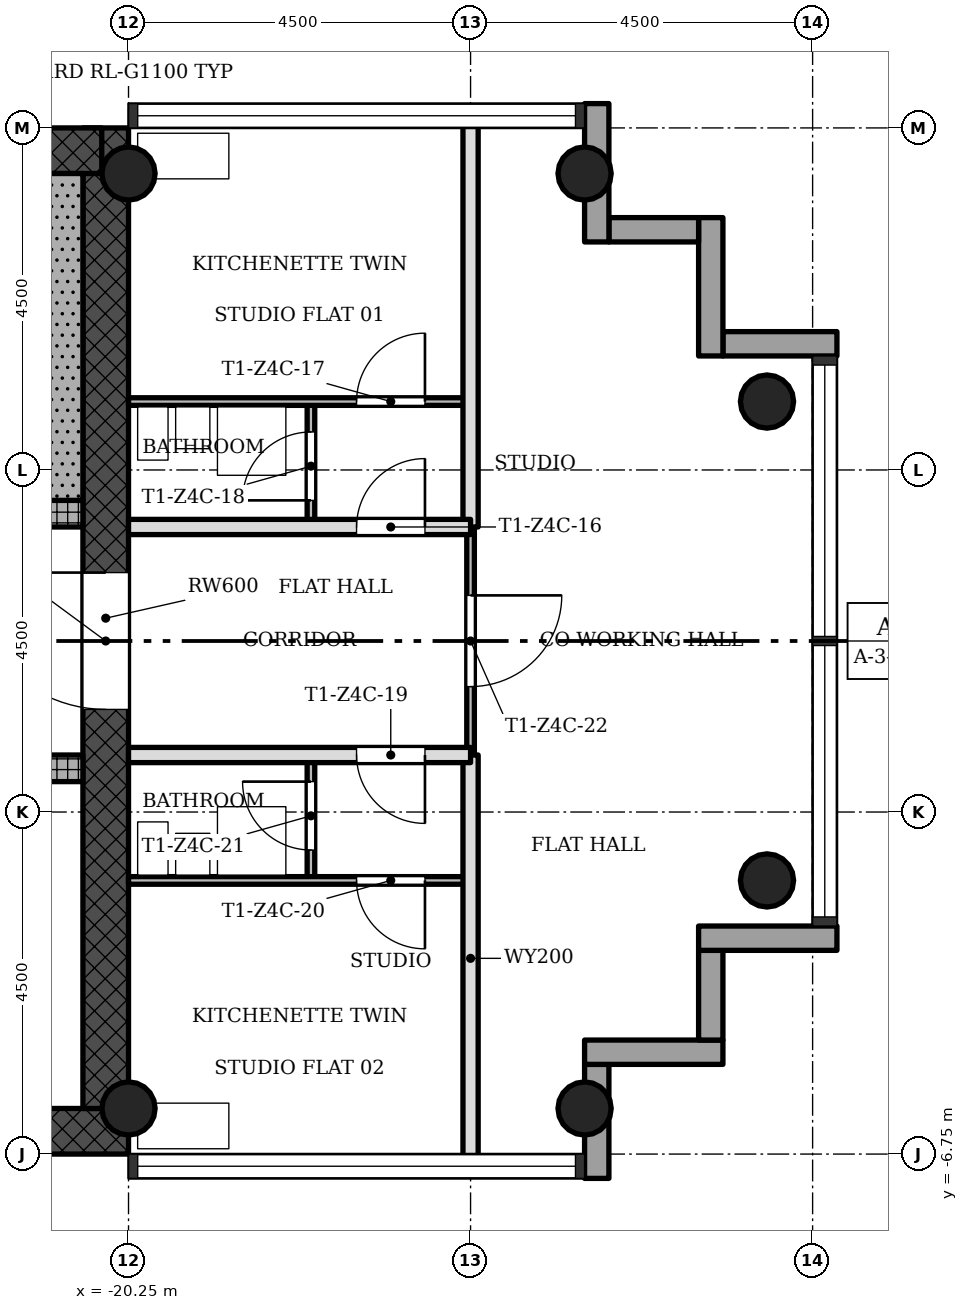
"""IFC4 building model, lengths in metres.
Left out: names, types, materials, properties, quantities, classifications, styles, units other than length and angle.
Written with IfcOpenShell. Run it as: python <this file> out.ifc"""

import sys

from ifc_helpers import new_model, si_unit, direction, frame, frame_2d, origin, origin_2d, place, context, subcontext, project, spatial, rectangle, hollow_circle, extrude, element, fill, save


model = new_model("IFC4")
c1 = context("Model", 3, precision=1e-05, world=origin(), true_north=direction((0.0, 1.0)))
c2 = subcontext(c1, "Body", "Model", "MODEL_VIEW")
j1 = project(units=[si_unit("LENGTHUNIT", "METRE"), si_unit("PLANEANGLEUNIT", "RADIAN")], contexts=[c1])
p1 = place(None, origin())
s1 = spatial("IfcSite", under=j1, at=p1, CompositionType="ELEMENT")
p2 = place(p1, origin())
s2 = spatial("IfcBuilding", under=s1, at=p2, CompositionType="ELEMENT")
p3 = place(p2, frame((0.0, 0.0, 192.6)))
s3 = spatial("IfcBuildingStorey", under=s2, at=p3, CompositionType="ELEMENT", Elevation=192.6)
p4 = place(p3, frame((-28.65, -6.45, 0.0), z_axis=(0.0, 0.0, 1.0), x_axis=(1.0, 0.0, 0.0)))
e1 = element("IfcWall", 1, at=p4, inside=s3, PredefinedType="SHEAR", context=c2, shape_type="SweptSolid", body=[
    extrude(rectangle(XDim=8.4, YDim=0.6, at=frame_2d((4.2, 0.0))), origin(), (0.0, 0.0, 1.0), 3.4),
])
p5 = place(p3, frame((-20.55, -6.15, 0.0), z_axis=(0.0, 0.0, 1.0), x_axis=(0.0, 1.0, 0.0)))
e2 = element("IfcWall", 2, at=p5, inside=s3, PredefinedType="SHEAR", context=c2, shape_type="SweptSolid", body=[
    extrude(rectangle(XDim=12.9, YDim=0.6, at=frame_2d((6.45, 0.0))), origin(), (0.0, 0.0, 1.0), 3.4),
])
p6 = place(p5, frame((5.25, 0.0, 0.0)))
e3 = element("IfcOpeningElement", 3, at=p6, cuts=e2, PredefinedType="OPENING", context=c2, shape_type="SweptSolid", body=[
    extrude(rectangle(XDim=1.8, YDim=2.1, at=frame_2d((0.9, 1.05))), frame((0.0, 0.31, 0.0), z_axis=(0.0, -1.0, 0.0), x_axis=(1.0, 0.0, 0.0)), (0.0, 0.0, 1.0), 0.62),
])
p7 = place(p3, frame((-20.602, 6.45, 0.0), z_axis=(0.0, 0.0, 1.0), x_axis=(-1.0, 0.0, 0.0)))
e4 = element("IfcWall", 4, at=p7, inside=s3, PredefinedType="SHEAR", context=c2, shape_type="SweptSolid", body=[
    extrude(rectangle(XDim=8.896, YDim=0.6, at=frame_2d((4.448, 0.0))), origin(), (0.0, 0.0, 1.0), 3.4),
])
p8 = place(p3, frame((-28.65, -1.675, 0.0), z_axis=(0.0, 0.0, 1.0), x_axis=(1.0, 0.0, 0.0)))
e5 = element("IfcWall", 5, at=p8, inside=s3, PredefinedType="SHEAR", context=c2, shape_type="SweptSolid", body=[
    extrude(rectangle(XDim=7.8, YDim=0.35, at=frame_2d((3.9, 0.0))), origin(), (0.0, 0.0, 1.0), 3.4),
])
p9 = place(p8, frame((1.15, 0.0, 0.0)))
e6 = element("IfcOpeningElement", 6, at=p9, cuts=e5, PredefinedType="OPENING", context=c2, shape_type="SweptSolid", body=[
    extrude(rectangle(XDim=1.1, YDim=2.1, at=frame_2d((0.55, 1.05))), frame((0.0, 0.185, 0.0), z_axis=(0.0, -1.0, 0.0), x_axis=(1.0, 0.0, 0.0)), (0.0, 0.0, 1.0), 0.37),
])
p10 = place(p8, frame((3.35, 0.0, 0.0)))
e7 = element("IfcOpeningElement", 7, at=p10, cuts=e5, PredefinedType="OPENING", context=c2, shape_type="SweptSolid", body=[
    extrude(rectangle(XDim=1.1, YDim=2.1, at=frame_2d((0.55, 1.05))), frame((0.0, 0.185, 0.0), z_axis=(0.0, -1.0, 0.0), x_axis=(1.0, 0.0, 0.0)), (0.0, 0.0, 1.0), 0.37),
])
p11 = place(p8, frame((5.55, 0.0, 0.0)))
e8 = element("IfcOpeningElement", 8, at=p11, cuts=e5, PredefinedType="OPENING", context=c2, shape_type="SweptSolid", body=[
    extrude(rectangle(XDim=1.1, YDim=2.1, at=frame_2d((0.55, 1.05))), frame((0.0, 0.185, 0.0), z_axis=(0.0, -1.0, 0.0), x_axis=(1.0, 0.0, 0.0)), (0.0, 0.0, 1.0), 0.37),
])
p12 = place(p3, frame((-28.65, 1.675, 0.0), z_axis=(0.0, 0.0, 1.0), x_axis=(1.0, 0.0, 0.0)))
e9 = element("IfcWall", 9, at=p12, inside=s3, PredefinedType="SHEAR", context=c2, shape_type="SweptSolid", body=[
    extrude(rectangle(XDim=7.8, YDim=0.35, at=frame_2d((3.9, 0.0))), origin(), (0.0, 0.0, 1.0), 3.4),
])
p13 = place(p12, frame((1.05, 0.0, 0.0)))
e10 = element("IfcOpeningElement", 10, at=p13, cuts=e9, PredefinedType="OPENING", context=c2, shape_type="SweptSolid", body=[
    extrude(rectangle(XDim=0.9, YDim=2.1, at=frame_2d((0.45, 1.05))), frame((0.0, 0.185, 0.0), z_axis=(0.0, -1.0, 0.0), x_axis=(1.0, 0.0, 0.0)), (0.0, 0.0, 1.0), 0.37),
])
for number, where, z_axis, x_axis in (
    (11, (-20.25, -6.15, 0.0), (0.0, 0.0, 1.0), (1.0, 0.0, 0.0)),
    (12, (-20.25, 6.15, 0.0), (0.0, 0.0, 1.0), (1.0, 0.0, 0.0)),
    (13, (-14.25, -6.15, 0.0), (0.0, 0.0, 1.0), (1.0, 0.0, 0.0)),
    (14, (-14.25, 6.15, 0.0), (0.0, 0.0, 1.0), (1.0, 0.0, 0.0)),
    (15, (-11.85, -3.15, 0.0), (0.0, 0.0, 1.0), (1.0, 0.0, 0.0)),
    (16, (-11.85, 3.15, 0.0), (0.0, 0.0, 1.0), (1.0, 0.0, 0.0)),
):
    element("IfcColumn", number, at=place(p3, frame(where, z_axis=z_axis, x_axis=x_axis)), inside=s3, PredefinedType="COLUMN", context=c2, shape_type="SweptSolid", body=[
        extrude(hollow_circle(Radius=0.35, WallThickness=0.025, at=origin_2d()), origin(), (0.0, 0.0, 1.0), 3.4),
    ])
p14 = place(p3, frame((-14.09, -7.07, -0.3), z_axis=(0.0, 0.0, 1.0), x_axis=(0.0, 1.0, 0.0)))
e17 = element("IfcWall", 17, at=p14, inside=s3, PredefinedType="STANDARD", context=c2, shape_type="SweptSolid", body=[
    extrude(rectangle(XDim=1.5, YDim=0.32, at=frame_2d((0.75, 0.0))), origin(), (0.0, 0.0, 1.0), 3.4),
])
p15 = place(p3, frame((-14.25, -5.41, -0.3), z_axis=(0.0, 0.0, 1.0), x_axis=(1.0, 0.0, 0.0)))
e18 = element("IfcWall", 18, at=p15, inside=s3, PredefinedType="STANDARD", context=c2, shape_type="SweptSolid", body=[
    extrude(rectangle(XDim=1.82, YDim=0.32, at=frame_2d((0.91, 0.0))), origin(), (0.0, 0.0, 1.0), 3.4),
])
p16 = place(p3, frame((-12.59, -5.25, -0.3), z_axis=(0.0, 0.0, 1.0), x_axis=(0.0, 1.0, 0.0)))
e19 = element("IfcWall", 19, at=p16, inside=s3, PredefinedType="STANDARD", context=c2, shape_type="SweptSolid", body=[
    extrude(rectangle(XDim=1.18, YDim=0.32, at=frame_2d((0.59, 0.0))), origin(), (0.0, 0.0, 1.0), 3.4),
])
p17 = place(p3, frame((-12.75, -3.91, -0.3), z_axis=(0.0, 0.0, 1.0), x_axis=(1.0, 0.0, 0.0)))
e20 = element("IfcWall", 20, at=p17, inside=s3, PredefinedType="STANDARD", context=c2, shape_type="SweptSolid", body=[
    extrude(rectangle(XDim=1.82, YDim=0.32, at=frame_2d((0.91, 0.0))), origin(), (0.0, 0.0, 1.0), 3.4),
])
p18 = place(p3, frame((-10.93, 3.91, -0.3), z_axis=(0.0, 0.0, 1.0), x_axis=(-1.0, 0.0, 0.0)))
e21 = element("IfcWall", 21, at=p18, inside=s3, PredefinedType="STANDARD", context=c2, shape_type="SweptSolid", body=[
    extrude(rectangle(XDim=1.5, YDim=0.32, at=frame_2d((0.75, 0.0))), origin(), (0.0, 0.0, 1.0), 3.4),
])
p19 = place(p3, frame((-12.59, 3.75, -0.3), z_axis=(0.0, 0.0, 1.0), x_axis=(0.0, 1.0, 0.0)))
e22 = element("IfcWall", 22, at=p19, inside=s3, PredefinedType="STANDARD", context=c2, shape_type="SweptSolid", body=[
    extrude(rectangle(XDim=1.82, YDim=0.32, at=frame_2d((0.91, 0.0))), origin(), (0.0, 0.0, 1.0), 3.4),
])
p20 = place(p3, frame((-12.75, 5.41, -0.3), z_axis=(0.0, 0.0, 1.0), x_axis=(-1.0, 0.0, 0.0)))
e23 = element("IfcWall", 23, at=p20, inside=s3, PredefinedType="STANDARD", context=c2, shape_type="SweptSolid", body=[
    extrude(rectangle(XDim=1.18, YDim=0.32, at=frame_2d((0.59, 0.0))), origin(), (0.0, 0.0, 1.0), 3.4),
])
p21 = place(p3, frame((-14.09, 5.25, -0.3), z_axis=(0.0, 0.0, 1.0), x_axis=(0.0, 1.0, 0.0)))
e24 = element("IfcWall", 24, at=p21, inside=s3, PredefinedType="STANDARD", context=c2, shape_type="SweptSolid", body=[
    extrude(rectangle(XDim=1.82, YDim=0.32, at=frame_2d((0.91, 0.0))), origin(), (0.0, 0.0, 1.0), 3.4),
])
p22 = place(p3, frame((-17.85, -3.15, 0.0), z_axis=(0.0, 0.0, 1.0), x_axis=(0.0, 1.0, 0.0)))
e25 = element("IfcWall", 25, at=p22, inside=s3, PredefinedType="PARTITIONING", context=c2, shape_type="SweptSolid", body=[
    extrude(rectangle(XDim=1.65, YDim=0.1, at=frame_2d((0.825, 0.0))), origin(), (0.0, 0.0, 1.0), 3.0),
])
p23 = place(p22, frame((0.4, 0.0, 0.0)))
e26 = element("IfcOpeningElement", 26, at=p23, cuts=e25, PredefinedType="OPENING", context=c2, shape_type="SweptSolid", body=[
    extrude(rectangle(XDim=0.9, YDim=2.1, at=frame_2d((0.45, 1.05))), frame((0.0, 0.06, 0.0), z_axis=(0.0, -1.0, 0.0), x_axis=(1.0, 0.0, 0.0)), (0.0, 0.0, 1.0), 0.12),
])
p24 = place(p3, frame((-17.85, 1.5, 0.0), z_axis=(0.0, 0.0, 1.0), x_axis=(0.0, 1.0, 0.0)))
e27 = element("IfcWall", 27, at=p24, inside=s3, PredefinedType="PARTITIONING", context=c2, shape_type="SweptSolid", body=[
    extrude(rectangle(XDim=1.65, YDim=0.1, at=frame_2d((0.825, 0.0))), origin(), (0.0, 0.0, 1.0), 3.0),
])
p25 = place(p24, frame((0.35, 0.0, 0.0)))
e28 = element("IfcOpeningElement", 28, at=p25, cuts=e27, PredefinedType="OPENING", context=c2, shape_type="SweptSolid", body=[
    extrude(rectangle(XDim=0.9, YDim=2.1, at=frame_2d((0.45, 1.05))), frame((0.0, 0.06, 0.0), z_axis=(0.0, -1.0, 0.0), x_axis=(1.0, 0.0, 0.0)), (0.0, 0.0, 1.0), 0.12),
])
p26 = place(p3, frame((-15.75, -1.5, 0.0), z_axis=(0.0, 0.0, 1.0), x_axis=(0.0, 1.0, 0.0)))
e29 = element("IfcWall", 29, at=p26, inside=s3, PredefinedType="PARTITIONING", context=c2, shape_type="SweptSolid", body=[
    extrude(rectangle(XDim=3.0, YDim=0.1, at=frame_2d((1.5, 0.0))), origin(), (0.0, 0.0, 1.0), 3.0),
])
p27 = place(p26, frame((0.9, 0.0, 0.0)))
e30 = element("IfcOpeningElement", 30, at=p27, cuts=e29, PredefinedType="OPENING", context=c2, shape_type="SweptSolid", body=[
    extrude(rectangle(XDim=1.2, YDim=2.1, at=frame_2d((0.6, 1.05))), frame((0.0, 0.06, 0.0), z_axis=(0.0, -1.0, 0.0), x_axis=(1.0, 0.0, 0.0)), (0.0, 0.0, 1.0), 0.12),
])
for number, where, z_axis, x_axis in (
    (31, (-15.75, -6.85, 0.0), (0.0, 0.0, 1.0), (0.0, 1.0, 0.0)),
    (32, (-15.75, 1.5, 0.0), (0.0, 0.0, 1.0), (0.0, 1.0, 0.0)),
):
    element("IfcWall", number, at=place(p3, frame(where, z_axis=z_axis, x_axis=x_axis)), inside=s3, PredefinedType="SOLIDWALL", context=c2, shape_type="SweptSolid", body=[
        extrude(rectangle(XDim=5.35, YDim=0.2, at=frame_2d((2.675, 0.0))), origin(), (0.0, 0.0, 1.0), 3.0),
    ])
p28 = place(p3, frame((-20.25, -3.15, 0.0), z_axis=(0.0, 0.0, 1.0), x_axis=(1.0, 0.0, 0.0)))
e33 = element("IfcWall", 33, at=p28, inside=s3, PredefinedType="PARTITIONING", context=c2, shape_type="SweptSolid", body=[
    extrude(rectangle(XDim=4.5, YDim=0.1, at=frame_2d((2.25, 0.0))), origin(), (0.0, 0.0, 1.0), 3.0),
])
p29 = place(p28, frame((3.0, 0.0, 0.0)))
e34 = element("IfcOpeningElement", 34, at=p29, cuts=e33, PredefinedType="OPENING", context=c2, shape_type="SweptSolid", body=[
    extrude(rectangle(XDim=0.9, YDim=2.1, at=frame_2d((0.45, 1.05))), frame((0.0, 0.06, 0.0), z_axis=(0.0, -1.0, 0.0), x_axis=(1.0, 0.0, 0.0)), (0.0, 0.0, 1.0), 0.12),
])
p30 = place(p3, frame((-20.25, -1.5, 0.0), z_axis=(0.0, 0.0, 1.0), x_axis=(1.0, 0.0, 0.0)))
e35 = element("IfcWall", 35, at=p30, inside=s3, PredefinedType="SOLIDWALL", context=c2, shape_type="SweptSolid", body=[
    extrude(rectangle(XDim=4.5, YDim=0.2, at=frame_2d((2.25, 0.0))), origin(), (0.0, 0.0, 1.0), 3.0),
])
p31 = place(p30, frame((3.0, 0.0, 0.0)))
e36 = element("IfcOpeningElement", 36, at=p31, cuts=e35, PredefinedType="OPENING", context=c2, shape_type="SweptSolid", body=[
    extrude(rectangle(XDim=0.9, YDim=2.1, at=frame_2d((0.45, 1.05))), frame((0.0, 0.11, 0.0), z_axis=(0.0, -1.0, 0.0), x_axis=(1.0, 0.0, 0.0)), (0.0, 0.0, 1.0), 0.22),
])
p32 = place(p3, frame((-20.25, 1.5, 0.0), z_axis=(0.0, 0.0, 1.0), x_axis=(1.0, 0.0, 0.0)))
e37 = element("IfcWall", 37, at=p32, inside=s3, PredefinedType="SOLIDWALL", context=c2, shape_type="SweptSolid", body=[
    extrude(rectangle(XDim=4.5, YDim=0.2, at=frame_2d((2.25, 0.0))), origin(), (0.0, 0.0, 1.0), 3.0),
])
p33 = place(p32, frame((3.0, 0.0, 0.0)))
e38 = element("IfcOpeningElement", 38, at=p33, cuts=e37, PredefinedType="OPENING", context=c2, shape_type="SweptSolid", body=[
    extrude(rectangle(XDim=0.9, YDim=2.1, at=frame_2d((0.45, 1.05))), frame((0.0, 0.11, 0.0), z_axis=(0.0, -1.0, 0.0), x_axis=(1.0, 0.0, 0.0)), (0.0, 0.0, 1.0), 0.22),
])
p34 = place(p3, frame((-20.25, 3.15, 0.0), z_axis=(0.0, 0.0, 1.0), x_axis=(1.0, 0.0, 0.0)))
e39 = element("IfcWall", 39, at=p34, inside=s3, PredefinedType="PARTITIONING", context=c2, shape_type="SweptSolid", body=[
    extrude(rectangle(XDim=4.5, YDim=0.1, at=frame_2d((2.25, 0.0))), origin(), (0.0, 0.0, 1.0), 3.0),
])
p35 = place(p34, frame((3.0, 0.0, 0.0)))
e40 = element("IfcOpeningElement", 40, at=p35, cuts=e39, PredefinedType="OPENING", context=c2, shape_type="SweptSolid", body=[
    extrude(rectangle(XDim=0.9, YDim=2.1, at=frame_2d((0.45, 1.05))), frame((0.0, 0.06, 0.0), z_axis=(0.0, -1.0, 0.0), x_axis=(1.0, 0.0, 0.0)), (0.0, 0.0, 1.0), 0.12),
])
p36 = place(p3, frame((-21.15, 1.85, 0.0), z_axis=(0.0, 0.0, 1.0), x_axis=(0.0, 1.0, 0.0)))
e41 = element("IfcWall", 41, at=p36, inside=s3, PredefinedType="SHEAR", context=c2, shape_type="SweptSolid", body=[
    extrude(rectangle(XDim=4.3, YDim=0.6, at=frame_2d((2.15, 0.0))), origin(), (0.0, 0.0, 1.0), 3.4),
])
p37 = place(p33, origin())
e42 = element("IfcDoor", 42, at=p37, inside=s3, OperationType="SINGLE_SWING_LEFT", PredefinedType="DOOR", context=c2, shape_type="SweptSolid", body=[
    extrude(rectangle(XDim=0.9, YDim=2.1, at=frame_2d((0.45, 1.05))), frame((0.0, 0.025, 0.0), z_axis=(0.0, -1.0, 0.0), x_axis=(1.0, 0.0, 0.0)), (0.0, 0.0, 1.0), 0.05),
])
fill(e38, e42)
p38 = place(p35, origin())
e43 = element("IfcDoor", 43, at=p38, inside=s3, OperationType="SINGLE_SWING_LEFT", PredefinedType="DOOR", context=c2, shape_type="SweptSolid", body=[
    extrude(rectangle(XDim=0.9, YDim=2.1, at=frame_2d((0.45, 1.05))), frame((0.0, 0.025, 0.0), z_axis=(0.0, -1.0, 0.0), x_axis=(1.0, 0.0, 0.0)), (0.0, 0.0, 1.0), 0.05),
])
fill(e40, e43)
p39 = place(p25, origin())
e44 = element("IfcDoor", 44, at=p39, inside=s3, OperationType="SINGLE_SWING_RIGHT", PredefinedType="DOOR", context=c2, shape_type="SweptSolid", body=[
    extrude(rectangle(XDim=0.9, YDim=2.1, at=frame_2d((0.45, 1.05))), frame((0.0, 0.025, 0.0), z_axis=(0.0, -1.0, 0.0), x_axis=(1.0, 0.0, 0.0)), (0.0, 0.0, 1.0), 0.05),
])
fill(e28, e44)
p40 = place(p31, origin())
e45 = element("IfcDoor", 45, at=p40, inside=s3, OperationType="SINGLE_SWING_RIGHT", PredefinedType="DOOR", context=c2, shape_type="SweptSolid", body=[
    extrude(rectangle(XDim=0.9, YDim=2.1, at=frame_2d((0.45, 1.05))), frame((0.0, 0.025, 0.0), z_axis=(0.0, -1.0, 0.0), x_axis=(1.0, 0.0, 0.0)), (0.0, 0.0, 1.0), 0.05),
])
fill(e36, e45)
p41 = place(p29, origin())
e46 = element("IfcDoor", 46, at=p41, inside=s3, OperationType="SINGLE_SWING_RIGHT", PredefinedType="DOOR", context=c2, shape_type="SweptSolid", body=[
    extrude(rectangle(XDim=0.9, YDim=2.1, at=frame_2d((0.45, 1.05))), frame((0.0, 0.025, 0.0), z_axis=(0.0, -1.0, 0.0), x_axis=(1.0, 0.0, 0.0)), (0.0, 0.0, 1.0), 0.05),
])
fill(e34, e46)
p42 = place(p23, origin())
e47 = element("IfcDoor", 47, at=p42, inside=s3, OperationType="SINGLE_SWING_LEFT", PredefinedType="DOOR", context=c2, shape_type="SweptSolid", body=[
    extrude(rectangle(XDim=0.9, YDim=2.1, at=frame_2d((0.45, 1.05))), frame((0.0, 0.025, 0.0), z_axis=(0.0, -1.0, 0.0), x_axis=(1.0, 0.0, 0.0)), (0.0, 0.0, 1.0), 0.05),
])
fill(e26, e47)
p43 = place(p27, origin())
e48 = element("IfcDoor", 48, at=p43, inside=s3, OperationType="SINGLE_SWING_RIGHT", PredefinedType="DOOR", context=c2, shape_type="SweptSolid", body=[
    extrude(rectangle(XDim=1.2, YDim=2.1, at=frame_2d((0.6, 1.05))), frame((0.0, 0.025, 0.0), z_axis=(0.0, -1.0, 0.0), x_axis=(1.0, 0.0, 0.0)), (0.0, 0.0, 1.0), 0.05),
])
fill(e30, e48)
p44 = place(p6, origin())
e49 = element("IfcDoor", 49, at=p44, inside=s3, OperationType="SINGLE_SWING_LEFT", PredefinedType="DOOR", context=c2, shape_type="SweptSolid", body=[
    extrude(rectangle(XDim=1.8, YDim=2.1, at=frame_2d((0.9, 1.05))), frame((0.0, 0.025, 0.0), z_axis=(0.0, -1.0, 0.0), x_axis=(1.0, 0.0, 0.0)), (0.0, 0.0, 1.0), 0.05),
])
fill(e3, e49)
save(model, sys.argv[1])
